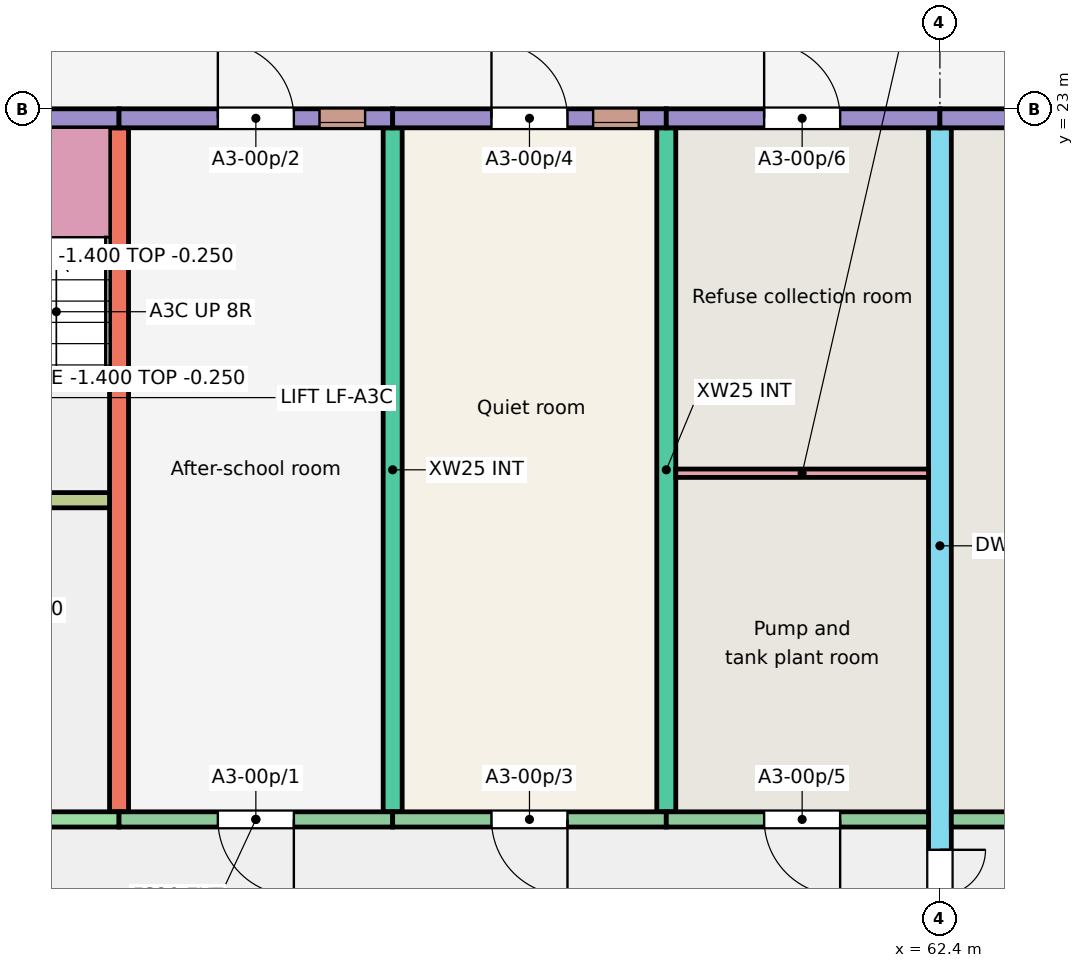
"""IFC4 building model, lengths in metres.
Left out: names, types, materials, properties, quantities, classifications, styles, units other than length and angle.
Written with IfcOpenShell. Run it as: python <this file> out.ifc"""

import sys

from ifc_helpers import new_model, si_unit, direction, frame, frame_2d, origin, place, context, subcontext, project, spatial, rectangle, extrude, element, fill, save


model = new_model("IFC4")
c1 = context("Model", 3, precision=1e-05, world=origin(), true_north=direction((0.0, 1.0)))
c2 = subcontext(c1, "Body", "Model", "MODEL_VIEW")
j1 = project(units=[si_unit("LENGTHUNIT", "METRE"), si_unit("PLANEANGLEUNIT", "RADIAN")], contexts=[c1])
p1 = place(None, origin())
s1 = spatial("IfcSite", under=j1, at=p1, CompositionType="ELEMENT")
p2 = place(p1, origin())
s2 = spatial("IfcBuilding", under=s1, at=p2, CompositionType="ELEMENT")
p3 = place(p2, origin())
s3 = spatial("IfcBuildingStorey", under=s2, at=p3, CompositionType="ELEMENT", Elevation=0.0)
for number, where, z_axis, x_axis in (
    (1, (51.6, 13.75, -0.25), (0.0, 0.0, 1.0), (0.0, 1.0, 0.0)),
    (2, (55.2, 13.75, -0.25), (0.0, 0.0, 1.0), (0.0, 1.0, 0.0)),
    (3, (58.8, 13.75, -0.25), (0.0, 0.0, 1.0), (0.0, 1.0, 0.0)),
):
    element("IfcWall", number, at=place(p3, frame(where, z_axis=z_axis, x_axis=x_axis)), inside=s3, PredefinedType="SHEAR", context=c2, shape_type="SweptSolid", body=[
        extrude(rectangle(XDim=9.0, YDim=0.25, at=frame_2d((4.5, 0.0))), origin(), (0.0, 0.0, 1.0), 3.25),
    ])
p4 = place(p3, frame((62.4, 11.75, -0.25), z_axis=(0.0, 0.0, 1.0), x_axis=(0.0, 1.0, 0.0)))
e4 = element("IfcWall", 4, at=p4, inside=s3, PredefinedType="SHEAR", context=c2, shape_type="SweptSolid", body=[
    extrude(rectangle(XDim=11.0, YDim=0.3, at=frame_2d((5.5, 0.0))), origin(), (0.0, 0.0, 1.0), 3.25),
])
p5 = place(p4, frame((0.3, 0.0, 0.25)))
e5 = element("IfcOpeningElement", 5, at=p5, cuts=e4, PredefinedType="OPENING", context=c2, shape_type="SweptSolid", body=[
    extrude(rectangle(XDim=1.2, YDim=2.1, at=frame_2d((0.6, 1.05))), frame((0.0, 0.16, 0.0), z_axis=(0.0, -1.0, 0.0), x_axis=(1.0, 0.0, 0.0)), (0.0, 0.0, 1.0), 0.32),
])
p6 = place(p3, frame((45.6, 22.875, -0.25), z_axis=(0.0, 0.0, 1.0), x_axis=(1.0, 0.0, 0.0)))
e6 = element("IfcWall", 6, at=p6, inside=s3, PredefinedType="SOLIDWALL", context=c2, shape_type="SweptSolid", body=[
    extrude(rectangle(XDim=6.0, YDim=0.25, at=frame_2d((3.0, 0.0))), origin(), (0.0, 0.0, 1.0), 3.25),
])
p7 = place(p6, frame((3.875, 0.0, 0.25)))
e7 = element("IfcOpeningElement", 7, at=p7, cuts=e6, PredefinedType="OPENING", context=c2, shape_type="SweptSolid", body=[
    extrude(rectangle(XDim=1.1, YDim=2.1, at=frame_2d((0.55, 1.05))), frame((0.0, 0.135, 0.0), z_axis=(0.0, -1.0, 0.0), x_axis=(1.0, 0.0, 0.0)), (0.0, 0.0, 1.0), 0.27),
])
p8 = place(p3, frame((45.75, 13.65, -0.25), z_axis=(0.0, 0.0, 1.0), x_axis=(1.0, 0.0, 0.0)))
e8 = element("IfcWall", 8, at=p8, inside=s3, PredefinedType="SHEAR", context=c2, shape_type="SweptSolid", body=[
    extrude(rectangle(XDim=5.85, YDim=0.2, at=frame_2d((2.925, 0.0))), origin(), (0.0, 0.0, 1.0), 3.25),
])
p9 = place(p8, frame((2.312, 0.0, 0.25)))
e9 = element("IfcOpeningElement", 9, at=p9, cuts=e8, PredefinedType="OPENING", context=c2, shape_type="SweptSolid", body=[
    extrude(rectangle(XDim=1.1, YDim=2.1, at=frame_2d((0.55, 1.05))), frame((0.0, 0.11, 0.0), z_axis=(0.0, -1.0, 0.0), x_axis=(1.0, 0.0, 0.0)), (0.0, 0.0, 1.0), 0.22),
])
p10 = place(p3, frame((45.75, 17.85, -0.25), z_axis=(0.0, 0.0, 1.0), x_axis=(1.0, 0.0, 0.0)))
e10 = element("IfcWall", 10, at=p10, inside=s3, PredefinedType="SHEAR", context=c2, shape_type="SweptSolid", body=[
    extrude(rectangle(XDim=5.725, YDim=0.2, at=frame_2d((2.863, 0.0))), origin(), (0.0, 0.0, 1.0), 3.25),
])
p11 = place(p10, frame((3.775, 0.0, 0.25)))
e11 = element("IfcOpeningElement", 11, at=p11, cuts=e10, PredefinedType="OPENING", context=c2, shape_type="SweptSolid", body=[
    extrude(rectangle(XDim=1.0, YDim=2.1, at=frame_2d((0.5, 1.05))), frame((0.0, 0.11, 0.0), z_axis=(0.0, -1.0, 0.0), x_axis=(1.0, 0.0, 0.0)), (0.0, 0.0, 1.0), 0.22),
])
p12 = place(p10, frame((0.762, 0.0, 0.25)))
e12 = element("IfcOpeningElement", 12, at=p12, cuts=e10, PredefinedType="OPENING", context=c2, shape_type="SweptSolid", body=[
    extrude(rectangle(XDim=1.1, YDim=2.1, at=frame_2d((0.55, 1.05))), frame((0.0, 0.11, 0.0), z_axis=(0.0, -1.0, 0.0), x_axis=(1.0, 0.0, 0.0)), (0.0, 0.0, 1.0), 0.22),
])
p13 = place(p3, frame((51.6, 22.875, -0.25), z_axis=(0.0, 0.0, 1.0), x_axis=(1.0, 0.0, 0.0)))
e13 = element("IfcWall", 13, at=p13, inside=s3, PredefinedType="SOLIDWALL", context=c2, shape_type="SweptSolid", body=[
    extrude(rectangle(XDim=3.6, YDim=0.25, at=frame_2d((1.8, 0.0))), origin(), (0.0, 0.0, 1.0), 3.25),
])
p14 = place(p13, frame((2.637, 0.0, 2.05)))
e14 = element("IfcOpeningElement", 14, at=p14, cuts=e13, PredefinedType="OPENING", context=c2, shape_type="SweptSolid", body=[
    extrude(rectangle(XDim=0.6, YDim=0.6, at=frame_2d((0.3, 0.3))), frame((0.0, 0.135, 0.0), z_axis=(0.0, -1.0, 0.0), x_axis=(1.0, 0.0, 0.0)), (0.0, 0.0, 1.0), 0.27),
])
p15 = place(p13, frame((1.3, 0.0, 0.25)))
e15 = element("IfcOpeningElement", 15, at=p15, cuts=e13, PredefinedType="OPENING", context=c2, shape_type="SweptSolid", body=[
    extrude(rectangle(XDim=1.0, YDim=2.1, at=frame_2d((0.5, 1.05))), frame((0.0, 0.135, 0.0), z_axis=(0.0, -1.0, 0.0), x_axis=(1.0, 0.0, 0.0)), (0.0, 0.0, 1.0), 0.27),
])
p16 = place(p3, frame((51.6, 13.65, -0.25), z_axis=(0.0, 0.0, 1.0), x_axis=(1.0, 0.0, 0.0)))
e16 = element("IfcWall", 16, at=p16, inside=s3, PredefinedType="SOLIDWALL", context=c2, shape_type="SweptSolid", body=[
    extrude(rectangle(XDim=3.6, YDim=0.2, at=frame_2d((1.8, 0.0))), origin(), (0.0, 0.0, 1.0), 3.25),
])
p17 = place(p16, frame((1.3, 0.0, 0.25)))
e17 = element("IfcOpeningElement", 17, at=p17, cuts=e16, PredefinedType="OPENING", context=c2, shape_type="SweptSolid", body=[
    extrude(rectangle(XDim=1.0, YDim=2.1, at=frame_2d((0.5, 1.05))), frame((0.0, 0.11, 0.0), z_axis=(0.0, -1.0, 0.0), x_axis=(1.0, 0.0, 0.0)), (0.0, 0.0, 1.0), 0.22),
])
p18 = place(p3, frame((55.2, 22.875, -0.25), z_axis=(0.0, 0.0, 1.0), x_axis=(1.0, 0.0, 0.0)))
e18 = element("IfcWall", 18, at=p18, inside=s3, PredefinedType="SOLIDWALL", context=c2, shape_type="SweptSolid", body=[
    extrude(rectangle(XDim=3.6, YDim=0.25, at=frame_2d((1.8, 0.0))), origin(), (0.0, 0.0, 1.0), 3.25),
])
p19 = place(p18, frame((2.637, 0.0, 2.05)))
e19 = element("IfcOpeningElement", 19, at=p19, cuts=e18, PredefinedType="OPENING", context=c2, shape_type="SweptSolid", body=[
    extrude(rectangle(XDim=0.6, YDim=0.6, at=frame_2d((0.3, 0.3))), frame((0.0, 0.135, 0.0), z_axis=(0.0, -1.0, 0.0), x_axis=(1.0, 0.0, 0.0)), (0.0, 0.0, 1.0), 0.27),
])
p20 = place(p18, frame((1.3, 0.0, 0.25)))
e20 = element("IfcOpeningElement", 20, at=p20, cuts=e18, PredefinedType="OPENING", context=c2, shape_type="SweptSolid", body=[
    extrude(rectangle(XDim=1.0, YDim=2.1, at=frame_2d((0.5, 1.05))), frame((0.0, 0.135, 0.0), z_axis=(0.0, -1.0, 0.0), x_axis=(1.0, 0.0, 0.0)), (0.0, 0.0, 1.0), 0.27),
])
p21 = place(p3, frame((55.2, 13.65, -0.25), z_axis=(0.0, 0.0, 1.0), x_axis=(1.0, 0.0, 0.0)))
e21 = element("IfcWall", 21, at=p21, inside=s3, PredefinedType="SOLIDWALL", context=c2, shape_type="SweptSolid", body=[
    extrude(rectangle(XDim=3.6, YDim=0.2, at=frame_2d((1.8, 0.0))), origin(), (0.0, 0.0, 1.0), 3.25),
])
p22 = place(p21, frame((1.3, 0.0, 0.25)))
e22 = element("IfcOpeningElement", 22, at=p22, cuts=e21, PredefinedType="OPENING", context=c2, shape_type="SweptSolid", body=[
    extrude(rectangle(XDim=1.0, YDim=2.1, at=frame_2d((0.5, 1.05))), frame((0.0, 0.11, 0.0), z_axis=(0.0, -1.0, 0.0), x_axis=(1.0, 0.0, 0.0)), (0.0, 0.0, 1.0), 0.22),
])
p23 = place(p3, frame((58.8, 22.875, -0.25), z_axis=(0.0, 0.0, 1.0), x_axis=(1.0, 0.0, 0.0)))
e23 = element("IfcWall", 23, at=p23, inside=s3, PredefinedType="SOLIDWALL", context=c2, shape_type="SweptSolid", body=[
    extrude(rectangle(XDim=3.6, YDim=0.25, at=frame_2d((1.8, 0.0))), origin(), (0.0, 0.0, 1.0), 3.25),
])
p24 = place(p23, frame((1.288, 0.0, 0.25)))
e24 = element("IfcOpeningElement", 24, at=p24, cuts=e23, PredefinedType="OPENING", context=c2, shape_type="SweptSolid", body=[
    extrude(rectangle(XDim=1.0, YDim=2.1, at=frame_2d((0.5, 1.05))), frame((0.0, 0.135, 0.0), z_axis=(0.0, -1.0, 0.0), x_axis=(1.0, 0.0, 0.0)), (0.0, 0.0, 1.0), 0.27),
])
p25 = place(p3, frame((58.8, 13.65, -0.25), z_axis=(0.0, 0.0, 1.0), x_axis=(1.0, 0.0, 0.0)))
e25 = element("IfcWall", 25, at=p25, inside=s3, PredefinedType="SOLIDWALL", context=c2, shape_type="SweptSolid", body=[
    extrude(rectangle(XDim=3.45, YDim=0.2, at=frame_2d((1.725, 0.0))), origin(), (0.0, 0.0, 1.0), 3.25),
])
p26 = place(p25, frame((1.288, 0.0, 0.25)))
e26 = element("IfcOpeningElement", 26, at=p26, cuts=e25, PredefinedType="OPENING", context=c2, shape_type="SweptSolid", body=[
    extrude(rectangle(XDim=1.0, YDim=2.1, at=frame_2d((0.5, 1.05))), frame((0.0, 0.11, 0.0), z_axis=(0.0, -1.0, 0.0), x_axis=(1.0, 0.0, 0.0)), (0.0, 0.0, 1.0), 0.22),
])
p27 = place(p3, frame((62.4, 22.875, -0.25), z_axis=(0.0, 0.0, 1.0), x_axis=(1.0, 0.0, 0.0)))
e27 = element("IfcWall", 27, at=p27, inside=s3, PredefinedType="SOLIDWALL", context=c2, shape_type="SweptSolid", body=[
    extrude(rectangle(XDim=3.6, YDim=0.25, at=frame_2d((1.8, 0.0))), origin(), (0.0, 0.0, 1.0), 3.25),
])
p28 = place(p27, frame((1.312, 0.0, 0.25)))
e28 = element("IfcOpeningElement", 28, at=p28, cuts=e27, PredefinedType="OPENING", context=c2, shape_type="SweptSolid", body=[
    extrude(rectangle(XDim=1.0, YDim=2.1, at=frame_2d((0.5, 1.05))), frame((0.0, 0.135, 0.0), z_axis=(0.0, -1.0, 0.0), x_axis=(1.0, 0.0, 0.0)), (0.0, 0.0, 1.0), 0.27),
])
p29 = place(p3, frame((62.55, 13.65, -0.25), z_axis=(0.0, 0.0, 1.0), x_axis=(1.0, 0.0, 0.0)))
e29 = element("IfcWall", 29, at=p29, inside=s3, PredefinedType="SOLIDWALL", context=c2, shape_type="SweptSolid", body=[
    extrude(rectangle(XDim=3.45, YDim=0.2, at=frame_2d((1.725, 0.0))), origin(), (0.0, 0.0, 1.0), 3.25),
])
p30 = place(p29, frame((1.163, 0.0, 0.25)))
e30 = element("IfcOpeningElement", 30, at=p30, cuts=e29, PredefinedType="OPENING", context=c2, shape_type="SweptSolid", body=[
    extrude(rectangle(XDim=1.0, YDim=2.1, at=frame_2d((0.5, 1.05))), frame((0.0, 0.11, 0.0), z_axis=(0.0, -1.0, 0.0), x_axis=(1.0, 0.0, 0.0)), (0.0, 0.0, 1.0), 0.22),
])
p31 = place(p3, frame((58.925, 18.205, 0.0), z_axis=(0.0, 0.0, 1.0), x_axis=(1.0, 0.0, 0.0)))
e31 = element("IfcWall", 31, at=p31, inside=s3, PredefinedType="PARTITIONING", context=c2, shape_type="SweptSolid", body=[
    extrude(rectangle(XDim=3.325, YDim=0.11, at=frame_2d((1.663, 0.0))), origin(), (0.0, 0.0, 1.0), 2.8),
])
p32 = place(p14, origin())
e32 = element("IfcWindow", 32, at=p32, inside=s3, PartitioningType="SINGLE_PANEL", PredefinedType="WINDOW", context=c2, shape_type="SweptSolid", body=[
    extrude(rectangle(XDim=0.6, YDim=0.6, at=frame_2d((0.3, 0.3))), frame((0.0, -0.025, 0.0), z_axis=(0.0, -1.0, 0.0), x_axis=(1.0, 0.0, 0.0)), (0.0, 0.0, 1.0), 0.06),
])
fill(e14, e32)
p33 = place(p19, origin())
e33 = element("IfcWindow", 33, at=p33, inside=s3, PartitioningType="SINGLE_PANEL", PredefinedType="WINDOW", context=c2, shape_type="SweptSolid", body=[
    extrude(rectangle(XDim=0.6, YDim=0.6, at=frame_2d((0.3, 0.3))), frame((0.0, -0.025, 0.0), z_axis=(0.0, -1.0, 0.0), x_axis=(1.0, 0.0, 0.0)), (0.0, 0.0, 1.0), 0.06),
])
fill(e19, e33)
p34 = place(p17, origin())
e34 = element("IfcDoor", 34, at=p34, inside=s3, OperationType="SINGLE_SWING_RIGHT", PredefinedType="DOOR", context=c2, shape_type="SweptSolid", body=[
    extrude(rectangle(XDim=1.0, YDim=2.1, at=frame_2d((0.5, 1.05))), frame((0.0, 0.025, 0.0), z_axis=(0.0, -1.0, 0.0), x_axis=(1.0, 0.0, 0.0)), (0.0, 0.0, 1.0), 0.05),
])
fill(e17, e34)
p35 = place(p15, origin())
e35 = element("IfcDoor", 35, at=p35, inside=s3, OperationType="SINGLE_SWING_LEFT", PredefinedType="DOOR", context=c2, shape_type="SweptSolid", body=[
    extrude(rectangle(XDim=1.0, YDim=2.1, at=frame_2d((0.5, 1.05))), frame((0.0, 0.025, 0.0), z_axis=(0.0, -1.0, 0.0), x_axis=(1.0, 0.0, 0.0)), (0.0, 0.0, 1.0), 0.05),
])
fill(e15, e35)
p36 = place(p22, origin())
e36 = element("IfcDoor", 36, at=p36, inside=s3, OperationType="SINGLE_SWING_RIGHT", PredefinedType="DOOR", context=c2, shape_type="SweptSolid", body=[
    extrude(rectangle(XDim=1.0, YDim=2.1, at=frame_2d((0.5, 1.05))), frame((0.0, 0.025, 0.0), z_axis=(0.0, -1.0, 0.0), x_axis=(1.0, 0.0, 0.0)), (0.0, 0.0, 1.0), 0.05),
])
fill(e22, e36)
p37 = place(p20, origin())
e37 = element("IfcDoor", 37, at=p37, inside=s3, OperationType="SINGLE_SWING_LEFT", PredefinedType="DOOR", context=c2, shape_type="SweptSolid", body=[
    extrude(rectangle(XDim=1.0, YDim=2.1, at=frame_2d((0.5, 1.05))), frame((0.0, 0.025, 0.0), z_axis=(0.0, -1.0, 0.0), x_axis=(1.0, 0.0, 0.0)), (0.0, 0.0, 1.0), 0.05),
])
fill(e20, e37)
p38 = place(p26, origin())
e38 = element("IfcDoor", 38, at=p38, inside=s3, OperationType="SINGLE_SWING_RIGHT", PredefinedType="DOOR", context=c2, shape_type="SweptSolid", body=[
    extrude(rectangle(XDim=1.0, YDim=2.1, at=frame_2d((0.5, 1.05))), frame((0.0, 0.025, 0.0), z_axis=(0.0, -1.0, 0.0), x_axis=(1.0, 0.0, 0.0)), (0.0, 0.0, 1.0), 0.05),
])
fill(e26, e38)
p39 = place(p24, origin())
e39 = element("IfcDoor", 39, at=p39, inside=s3, OperationType="SINGLE_SWING_LEFT", PredefinedType="DOOR", context=c2, shape_type="SweptSolid", body=[
    extrude(rectangle(XDim=1.0, YDim=2.1, at=frame_2d((0.5, 1.05))), frame((0.0, 0.025, 0.0), z_axis=(0.0, -1.0, 0.0), x_axis=(1.0, 0.0, 0.0)), (0.0, 0.0, 1.0), 0.05),
])
fill(e24, e39)
p40 = place(p5, origin())
e40 = element("IfcDoor", 40, at=p40, inside=s3, OperationType="DOUBLE_DOOR_SINGLE_SWING", PredefinedType="DOOR", context=c2, shape_type="SweptSolid", body=[
    extrude(rectangle(XDim=1.2, YDim=2.1, at=frame_2d((0.6, 1.05))), frame((0.0, 0.025, 0.0), z_axis=(0.0, -1.0, 0.0), x_axis=(1.0, 0.0, 0.0)), (0.0, 0.0, 1.0), 0.05),
])
fill(e5, e40)
save(model, sys.argv[1])
